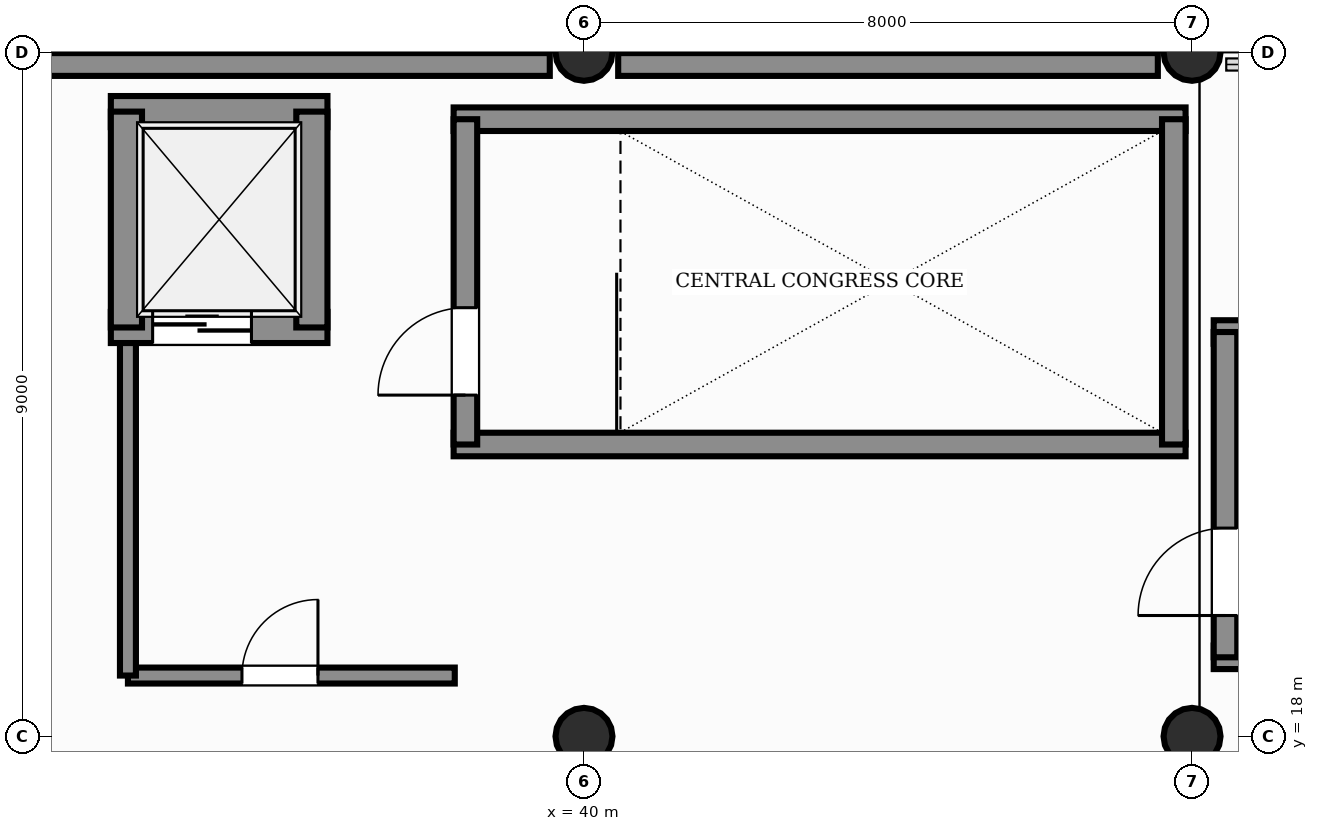
"""IFC4 building model, lengths in metres.
Left out: names, types, materials, properties, quantities, classifications, styles, units other than length and angle.
Written with IfcOpenShell. Run it as: python <this file> out.ifc"""

import sys

from ifc_helpers import new_model, si_unit, direction, frame, frame_2d, origin, origin_2d, place, context, subcontext, project, spatial, rectangle, circle, extrude, element, fill, save


model = new_model("IFC4")
c1 = context("Model", 3, precision=1e-05, world=origin(), true_north=direction((0.0, 1.0)))
c2 = subcontext(c1, "Body", "Model", "MODEL_VIEW")
j1 = project(units=[si_unit("LENGTHUNIT", "METRE"), si_unit("PLANEANGLEUNIT", "RADIAN")], contexts=[c1])
p1 = place(None, origin())
s1 = spatial("IfcSite", under=j1, at=p1, CompositionType="ELEMENT")
p2 = place(p1, origin())
s2 = spatial("IfcBuilding", under=s1, at=p2, CompositionType="ELEMENT")
p3 = place(p2, frame((0.0, 0.0, 21.0)))
s3 = spatial("IfcBuildingStorey", under=s2, at=p3, CompositionType="ELEMENT", Elevation=21.0)
for number, where, z_axis, x_axis in (
    (1, (40.0, 18.0, 0.0), (0.0, 0.0, 1.0), (1.0, 0.0, 0.0)),
    (2, (40.0, 27.0, 0.0), (0.0, 0.0, 1.0), (1.0, 0.0, 0.0)),
    (3, (48.0, 18.0, 0.0), (0.0, 0.0, 1.0), (1.0, 0.0, 0.0)),
    (4, (48.0, 27.0, 0.0), (0.0, 0.0, 1.0), (1.0, 0.0, 0.0)),
):
    element("IfcColumn", number, at=place(p3, frame(where, z_axis=z_axis, x_axis=x_axis)), inside=s3, PredefinedType="COLUMN", context=c2, shape_type="SweptSolid", body=[
        extrude(circle(Radius=0.375, at=origin_2d()), origin(), (0.0, 0.0, 1.0), 4.8),
    ])
for number, where, z_axis, x_axis in (
    (5, (32.45, 26.84, 0.0), (0.0, 0.0, 1.0), (1.0, 0.0, 0.0)),
    (6, (40.45, 26.84, 0.0), (0.0, 0.0, 1.0), (1.0, 0.0, 0.0)),
):
    element("IfcWall", number, at=place(p3, frame(where, z_axis=z_axis, x_axis=x_axis)), inside=s3, PredefinedType="SOLIDWALL", context=c2, shape_type="SweptSolid", body=[
        extrude(rectangle(XDim=7.1, YDim=0.3, at=frame_2d((3.55, 0.0))), origin(), (0.0, 0.0, 1.0), 3.68),
    ])
for number, where, z_axis, x_axis in (
    (7, (38.285, 21.84, 0.0), (0.0, 0.0, 1.0), (1.0, 0.0, 0.0)),
    (8, (38.285, 26.12, 0.0), (0.0, 0.0, 1.0), (1.0, 0.0, 0.0)),
):
    element("IfcWall", number, at=place(p3, frame(where, z_axis=z_axis, x_axis=x_axis)), inside=s3, PredefinedType="SHEAR", context=c2, shape_type="SweptSolid", body=[
        extrude(rectangle(XDim=9.63, YDim=0.31, at=frame_2d((4.815, 0.0))), origin(), (0.0, 0.0, 1.0), 4.8),
    ])
p4 = place(p3, frame((38.44, 21.84, 0.0), z_axis=(0.0, 0.0, 1.0), x_axis=(0.0, 1.0, 0.0)))
e9 = element("IfcWall", 9, at=p4, inside=s3, PredefinedType="SHEAR", context=c2, shape_type="SweptSolid", body=[
    extrude(rectangle(XDim=4.28, YDim=0.31, at=frame_2d((2.14, 0.0))), origin(), (0.0, 0.0, 1.0), 4.8),
])
p5 = place(p4, frame((0.65, 0.0, 0.0)))
e10 = element("IfcOpeningElement", 10, at=p5, cuts=e9, PredefinedType="OPENING", context=c2, shape_type="SweptSolid", body=[
    extrude(rectangle(XDim=1.15, YDim=2.2, at=frame_2d((0.575, 1.1))), frame((0.0, 0.165, 0.0), z_axis=(0.0, -1.0, 0.0), x_axis=(1.0, 0.0, 0.0)), (0.0, 0.0, 1.0), 0.33),
])
p6 = place(p3, frame((47.76, 21.84, 0.0), z_axis=(0.0, 0.0, 1.0), x_axis=(0.0, 1.0, 0.0)))
e11 = element("IfcWall", 11, at=p6, inside=s3, PredefinedType="SHEAR", context=c2, shape_type="SweptSolid", body=[
    extrude(rectangle(XDim=4.28, YDim=0.31, at=frame_2d((2.14, 0.0))), origin(), (0.0, 0.0, 1.0), 4.8),
])
p7 = place(p3, frame((34.0, 18.8, 0.0), z_axis=(0.0, 0.0, 1.0), x_axis=(1.0, 0.0, 0.0)))
e12 = element("IfcWall", 12, at=p7, inside=s3, PredefinedType="PARTITIONING", context=c2, shape_type="SweptSolid", body=[
    extrude(rectangle(XDim=4.3, YDim=0.21, at=frame_2d((2.15, 0.0))), origin(), (0.0, 0.0, 1.0), 3.6),
])
p8 = place(p7, frame((1.5, 0.0, 0.0)))
e13 = element("IfcOpeningElement", 13, at=p8, cuts=e12, PredefinedType="OPENING", context=c2, shape_type="SweptSolid", body=[
    extrude(rectangle(XDim=1.0, YDim=2.15, at=frame_2d((0.5, 1.075))), frame((0.0, 0.115, 0.0), z_axis=(0.0, -1.0, 0.0), x_axis=(1.0, 0.0, 0.0)), (0.0, 0.0, 1.0), 0.23),
])
p9 = place(p3, frame((34.0, 18.8, 0.0), z_axis=(0.0, 0.0, 1.0), x_axis=(0.0, 1.0, 0.0)))
e14 = element("IfcWall", 14, at=p9, inside=s3, PredefinedType="PARTITIONING", context=c2, shape_type="SweptSolid", body=[
    extrude(rectangle(XDim=4.6, YDim=0.21, at=frame_2d((2.3, 0.0))), origin(), (0.0, 0.0, 1.0), 3.6),
])
p10 = place(p3, frame((33.775, 23.38, 0.0), z_axis=(0.0, 0.0, 1.0), x_axis=(1.0, 0.0, 0.0)))
e15 = element("IfcWall", 15, at=p10, inside=s3, PredefinedType="SHEAR", context=c2, shape_type="SweptSolid", body=[
    extrude(rectangle(XDim=2.85, YDim=0.41, at=frame_2d((1.425, 0.0))), origin(), (0.0, 0.0, 1.0), 4.8),
])
p11 = place(p10, frame((0.55, 0.0, 0.0)))
e16 = element("IfcOpeningElement", 16, at=p11, cuts=e15, PredefinedType="OPENING", context=c2, shape_type="SweptSolid", body=[
    extrude(rectangle(XDim=1.3, YDim=2.25, at=frame_2d((0.65, 1.125))), frame((0.0, 0.215, 0.0), z_axis=(0.0, -1.0, 0.0), x_axis=(1.0, 0.0, 0.0)), (0.0, 0.0, 1.0), 0.43),
])
p12 = place(p3, frame((33.775, 26.22, 0.0), z_axis=(0.0, 0.0, 1.0), x_axis=(1.0, 0.0, 0.0)))
e17 = element("IfcWall", 17, at=p12, inside=s3, PredefinedType="SHEAR", context=c2, shape_type="SweptSolid", body=[
    extrude(rectangle(XDim=2.85, YDim=0.41, at=frame_2d((1.425, 0.0))), origin(), (0.0, 0.0, 1.0), 4.8),
])
for number, where, z_axis, x_axis in (
    (18, (33.98, 23.38, 0.0), (0.0, 0.0, 1.0), (0.0, 1.0, 0.0)),
    (19, (36.42, 23.38, 0.0), (0.0, 0.0, 1.0), (0.0, 1.0, 0.0)),
):
    element("IfcWall", number, at=place(p3, frame(where, z_axis=z_axis, x_axis=x_axis)), inside=s3, PredefinedType="SHEAR", context=c2, shape_type="SweptSolid", body=[
        extrude(rectangle(XDim=2.84, YDim=0.41, at=frame_2d((1.42, 0.0))), origin(), (0.0, 0.0, 1.0), 4.8),
    ])
for number, where, z_axis, x_axis in (
    (20, (48.285, 19.04, 0.0), (0.0, 0.0, 1.0), (1.0, 0.0, 0.0)),
    (21, (48.285, 23.32, 0.0), (0.0, 0.0, 1.0), (1.0, 0.0, 0.0)),
):
    element("IfcWall", number, at=place(p3, frame(where, z_axis=z_axis, x_axis=x_axis)), inside=s3, PredefinedType="SHEAR", context=c2, shape_type="SweptSolid", body=[
        extrude(rectangle(XDim=9.63, YDim=0.31, at=frame_2d((4.815, 0.0))), origin(), (0.0, 0.0, 1.0), 4.8),
    ])
p13 = place(p3, frame((48.44, 19.04, 0.0), z_axis=(0.0, 0.0, 1.0), x_axis=(0.0, 1.0, 0.0)))
e22 = element("IfcWall", 22, at=p13, inside=s3, PredefinedType="SHEAR", context=c2, shape_type="SweptSolid", body=[
    extrude(rectangle(XDim=4.28, YDim=0.31, at=frame_2d((2.14, 0.0))), origin(), (0.0, 0.0, 1.0), 4.8),
])
p14 = place(p13, frame((0.55, 0.0, 0.0)))
e23 = element("IfcOpeningElement", 23, at=p14, cuts=e22, PredefinedType="OPENING", context=c2, shape_type="SweptSolid", body=[
    extrude(rectangle(XDim=1.15, YDim=2.2, at=frame_2d((0.575, 1.1))), frame((0.0, 0.165, 0.0), z_axis=(0.0, -1.0, 0.0), x_axis=(1.0, 0.0, 0.0)), (0.0, 0.0, 1.0), 0.33),
])
p15 = place(p5, origin())
e24 = element("IfcDoor", 24, at=p15, inside=s3, OperationType="SINGLE_SWING_LEFT", PredefinedType="DOOR", context=c2, shape_type="SweptSolid", body=[
    extrude(rectangle(XDim=1.15, YDim=2.2, at=frame_2d((0.575, 1.1))), frame((0.0, 0.025, 0.0), z_axis=(0.0, -1.0, 0.0), x_axis=(1.0, 0.0, 0.0)), (0.0, 0.0, 1.0), 0.05),
])
fill(e10, e24)
p16 = place(p8, origin())
e25 = element("IfcDoor", 25, at=p16, inside=s3, OperationType="SINGLE_SWING_RIGHT", PredefinedType="DOOR", context=c2, shape_type="SweptSolid", body=[
    extrude(rectangle(XDim=1.0, YDim=2.15, at=frame_2d((0.5, 1.075))), frame((0.0, 0.025, 0.0), z_axis=(0.0, -1.0, 0.0), x_axis=(1.0, 0.0, 0.0)), (0.0, 0.0, 1.0), 0.05),
])
fill(e13, e25)
p17 = place(p11, origin())
e26 = element("IfcDoor", 26, at=p17, inside=s3, OperationType="DOUBLE_DOOR_SLIDING", PredefinedType="DOOR", context=c2, shape_type="SweptSolid", body=[
    extrude(rectangle(XDim=1.3, YDim=2.25, at=frame_2d((0.65, 1.125))), frame((0.0, 0.025, 0.0), z_axis=(0.0, -1.0, 0.0), x_axis=(1.0, 0.0, 0.0)), (0.0, 0.0, 1.0), 0.05),
])
fill(e16, e26)
p18 = place(p14, origin())
e27 = element("IfcDoor", 27, at=p18, inside=s3, OperationType="SINGLE_SWING_LEFT", PredefinedType="DOOR", context=c2, shape_type="SweptSolid", body=[
    extrude(rectangle(XDim=1.15, YDim=2.2, at=frame_2d((0.575, 1.1))), frame((0.0, 0.025, 0.0), z_axis=(0.0, -1.0, 0.0), x_axis=(1.0, 0.0, 0.0)), (0.0, 0.0, 1.0), 0.05),
])
fill(e23, e27)
save(model, sys.argv[1])
